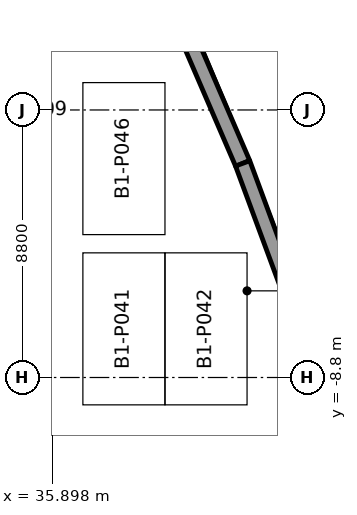
"""IFC4 building model, lengths in metres.
Left out: names, types, materials, properties, quantities, classifications, styles, units other than length and angle.
Written with IfcOpenShell. Run it as: python <this file> out.ifc"""

import sys

from ifc_helpers import new_model, si_unit, direction, frame, frame_2d, origin, place, context, subcontext, project, spatial, rectangle, extrude, element, save


model = new_model("IFC4")
c1 = context("Model", 3, precision=1e-05, world=origin(), true_north=direction((0.0, 1.0)))
c2 = subcontext(c1, "Body", "Model", "MODEL_VIEW")
j1 = project(units=[si_unit("LENGTHUNIT", "METRE"), si_unit("PLANEANGLEUNIT", "RADIAN")], contexts=[c1])
p1 = place(None, origin())
s1 = spatial("IfcSite", under=j1, at=p1, CompositionType="ELEMENT")
p2 = place(p1, origin())
s2 = spatial("IfcBuilding", under=s1, at=p2, CompositionType="ELEMENT")
p3 = place(p2, frame((0.0, 0.0, -4.5)))
s3 = spatial("IfcBuildingStorey", under=s2, at=p3, CompositionType="ELEMENT", Elevation=-4.5)
p4 = place(p3, frame((38.768, 6.09, 0.0), z_axis=(0.0, 0.0, 1.0), x_axis=(0.396224264914, -0.918153762664, 0.0)))
e1 = element("IfcWall", 1, at=p4, inside=s3, PredefinedType="SOLIDWALL", context=c2, shape_type="SweptSolid", body=[
    extrude(rectangle(XDim=8.547, YDim=0.5, at=frame_2d((4.274, 0.0))), origin(), (0.0, 0.0, 1.0), 4.5),
])
p5 = place(p3, frame((42.155, -1.758, 0.0), z_axis=(0.0, 0.0, 1.0), x_axis=(0.346876937077, -0.937910651674, 0.0)))
e2 = element("IfcWall", 2, at=p5, inside=s3, PredefinedType="SOLIDWALL", context=c2, shape_type="SweptSolid", body=[
    extrude(rectangle(XDim=8.235, YDim=0.5, at=frame_2d((4.118, 0.0))), origin(), (0.0, 0.0, 1.0), 4.5),
])
save(model, sys.argv[1])
